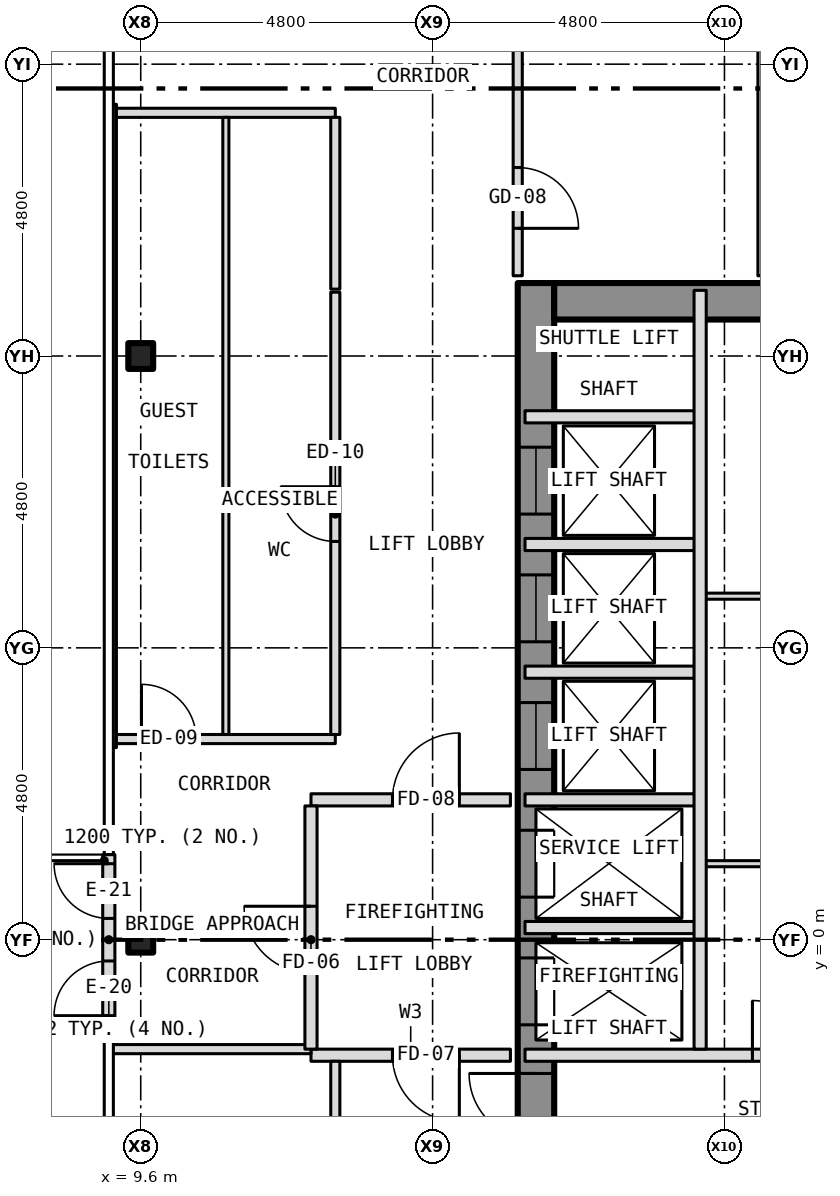
"""IFC4 building model, lengths in metres.
Left out: names, types, materials, properties, quantities, classifications, styles, units other than length and angle.
Written with IfcOpenShell. Run it as: python <this file> out.ifc"""

import sys

from ifc_helpers import new_model, si_unit, direction, frame, frame_2d, origin, origin_2d, place, context, subcontext, project, spatial, rectangle, i_section, extrude, element, fill, save


model = new_model("IFC4")
c1 = context("Model", 3, precision=1e-05, world=origin(), true_north=direction((0.0, 1.0)))
c2 = subcontext(c1, "Body", "Model", "MODEL_VIEW")
j1 = project(units=[si_unit("LENGTHUNIT", "METRE"), si_unit("PLANEANGLEUNIT", "RADIAN")], contexts=[c1])
p1 = place(None, origin())
s1 = spatial("IfcSite", under=j1, at=p1, CompositionType="ELEMENT")
p2 = place(p1, origin())
s2 = spatial("IfcBuilding", under=s1, at=p2, CompositionType="ELEMENT")
p3 = place(p2, frame((0.0, 0.0, 63.5)))
s3 = spatial("IfcBuildingStorey", under=s2, at=p3, CompositionType="ELEMENT", Elevation=63.5)
for number, where, z_axis, x_axis in (
    (1, (9.6, 0.0, -0.15), (0.0, 0.0, 1.0), (1.0, 0.0, 0.0)),
    (2, (9.6, 9.6, -0.15), (0.0, 0.0, 1.0), (1.0, 0.0, 0.0)),
):
    element("IfcColumn", number, at=place(p3, frame(where, z_axis=z_axis, x_axis=x_axis)), inside=s3, PredefinedType="COLUMN", context=c2, shape_type="SweptSolid", body=[
        extrude(i_section(OverallWidth=0.409, OverallDepth=0.424, WebThickness=0.033, FlangeThickness=0.052, at=origin_2d()), origin(), (0.0, 0.0, 1.0), 3.5),
    ])
p4 = place(p3, frame((16.1, -10.8, 0.0), z_axis=(0.0, 0.0, 1.0), x_axis=(0.0, 1.0, 0.0)))
e3 = element("IfcWall", 3, at=p4, inside=s3, PredefinedType="SHEAR", context=c2, shape_type="SweptSolid", body=[
    extrude(rectangle(XDim=21.6, YDim=0.6, at=frame_2d((10.8, 0.0))), origin(), (0.0, 0.0, 1.0), 3.25),
])
p5 = place(p4, frame((9.4, 0.0, 0.0)))
e4 = element("IfcOpeningElement", 4, at=p5, cuts=e3, PredefinedType="OPENING", context=c2, shape_type="SweptSolid", body=[
    extrude(rectangle(XDim=1.1, YDim=2.1, at=frame_2d((0.55, 1.05))), frame((0.0, 0.312, 0.0), z_axis=(0.0, -1.0, 0.0), x_axis=(1.0, 0.0, 0.0)), (0.0, 0.0, 1.0), 0.624),
])
p6 = place(p4, frame((11.5, 0.0, 0.0)))
e5 = element("IfcOpeningElement", 5, at=p6, cuts=e3, PredefinedType="OPENING", context=c2, shape_type="SweptSolid", body=[
    extrude(rectangle(XDim=1.1, YDim=2.1, at=frame_2d((0.55, 1.05))), frame((0.0, 0.312, 0.0), z_axis=(0.0, -1.0, 0.0), x_axis=(1.0, 0.0, 0.0)), (0.0, 0.0, 1.0), 0.624),
])
p7 = place(p4, frame((13.6, 0.0, 0.0)))
e6 = element("IfcOpeningElement", 6, at=p7, cuts=e3, PredefinedType="OPENING", context=c2, shape_type="SweptSolid", body=[
    extrude(rectangle(XDim=1.1, YDim=2.1, at=frame_2d((0.55, 1.05))), frame((0.0, 0.312, 0.0), z_axis=(0.0, -1.0, 0.0), x_axis=(1.0, 0.0, 0.0)), (0.0, 0.0, 1.0), 0.624),
])
p8 = place(p4, frame((15.7, 0.0, 0.0)))
e7 = element("IfcOpeningElement", 7, at=p8, cuts=e3, PredefinedType="OPENING", context=c2, shape_type="SweptSolid", body=[
    extrude(rectangle(XDim=1.1, YDim=2.1, at=frame_2d((0.55, 1.05))), frame((0.0, 0.312, 0.0), z_axis=(0.0, -1.0, 0.0), x_axis=(1.0, 0.0, 0.0)), (0.0, 0.0, 1.0), 0.624),
])
p9 = place(p4, frame((17.8, 0.0, 0.0)))
e8 = element("IfcOpeningElement", 8, at=p9, cuts=e3, PredefinedType="OPENING", context=c2, shape_type="SweptSolid", body=[
    extrude(rectangle(XDim=1.1, YDim=2.1, at=frame_2d((0.55, 1.05))), frame((0.0, 0.312, 0.0), z_axis=(0.0, -1.0, 0.0), x_axis=(1.0, 0.0, 0.0)), (0.0, 0.0, 1.0), 0.624),
])
p10 = place(p4, frame((5.642, 0.0, 0.0)))
e9 = element("IfcOpeningElement", 9, at=p10, cuts=e3, PredefinedType="OPENING", context=c2, shape_type="SweptSolid", body=[
    extrude(rectangle(XDim=1.1, YDim=2.1, at=frame_2d((0.55, 1.05))), frame((0.0, 0.312, 0.0), z_axis=(0.0, -1.0, 0.0), x_axis=(1.0, 0.0, 0.0)), (0.0, 0.0, 1.0), 0.624),
])
p11 = place(p4, frame((7.5, 0.0, 0.0)))
e10 = element("IfcOpeningElement", 10, at=p11, cuts=e3, PredefinedType="OPENING", context=c2, shape_type="SweptSolid", body=[
    extrude(rectangle(XDim=1.1, YDim=2.1, at=frame_2d((0.55, 1.05))), frame((0.0, 0.312, 0.0), z_axis=(0.0, -1.0, 0.0), x_axis=(1.0, 0.0, 0.0)), (0.0, 0.0, 1.0), 0.624),
])
p12 = place(p3, frame((16.4, 10.5, 0.0), z_axis=(0.0, 0.0, 1.0), x_axis=(1.0, 0.0, 0.0)))
e11 = element("IfcWall", 11, at=p12, inside=s3, PredefinedType="SHEAR", context=c2, shape_type="SweptSolid", body=[
    extrude(rectangle(XDim=7.0, YDim=0.6, at=frame_2d((3.5, 0.0))), origin(), (0.0, 0.0, 1.0), 3.25),
])
p13 = place(p3, frame((9.075, -1.4, 0.0), z_axis=(0.0, 0.0, 1.0), x_axis=(0.0, 1.0, 0.0)))
e12 = element("IfcWall", 12, at=p13, inside=s3, PredefinedType="SOLIDWALL", context=c2, shape_type="SweptSolid", body=[
    extrude(rectangle(XDim=2.8, YDim=0.2, at=frame_2d((1.4, 0.0))), origin(), (0.0, 0.0, 1.0), 3.5),
])
p14 = place(p13, frame((0.15, 0.0, 0.0)))
e13 = element("IfcOpeningElement", 13, at=p14, cuts=e12, PredefinedType="OPENING", context=c2, shape_type="SweptSolid", body=[
    extrude(rectangle(XDim=0.9, YDim=2.1, at=frame_2d((0.45, 1.05))), frame((0.0, 0.112, 0.0), z_axis=(0.0, -1.0, 0.0), x_axis=(1.0, 0.0, 0.0)), (0.0, 0.0, 1.0), 0.224),
])
p15 = place(p13, frame((1.75, 0.0, 0.0)))
e14 = element("IfcOpeningElement", 14, at=p15, cuts=e12, PredefinedType="OPENING", context=c2, shape_type="SweptSolid", body=[
    extrude(rectangle(XDim=0.9, YDim=2.1, at=frame_2d((0.45, 1.05))), frame((0.0, 0.112, 0.0), z_axis=(0.0, -1.0, 0.0), x_axis=(1.0, 0.0, 0.0)), (0.0, 0.0, 1.0), 0.224),
])
p16 = place(p3, frame((12.4, -1.9, 0.0), z_axis=(0.0, 0.0, 1.0), x_axis=(1.0, 0.0, 0.0)))
e15 = element("IfcWall", 15, at=p16, inside=s3, PredefinedType="PARTITIONING", context=c2, shape_type="SweptSolid", body=[
    extrude(rectangle(XDim=3.28, YDim=0.2, at=frame_2d((1.64, 0.0))), origin(), (0.0, 0.0, 1.0), 3.35),
])
p17 = place(p16, frame((1.34, 0.0, 0.0)))
e16 = element("IfcOpeningElement", 16, at=p17, cuts=e15, PredefinedType="OPENING", context=c2, shape_type="SweptSolid", body=[
    extrude(rectangle(XDim=1.1, YDim=2.1, at=frame_2d((0.55, 1.05))), frame((0.0, 0.112, 0.0), z_axis=(0.0, -1.0, 0.0), x_axis=(1.0, 0.0, 0.0)), (0.0, 0.0, 1.0), 0.224),
])
p18 = place(p3, frame((15.92, -1.9, 0.0), z_axis=(0.0, 0.0, 1.0), x_axis=(1.0, 0.0, 0.0)))
e17 = element("IfcWall", 17, at=p18, inside=s3, PredefinedType="PARTITIONING", context=c2, shape_type="SweptSolid", body=[
    extrude(rectangle(XDim=7.96, YDim=0.2, at=frame_2d((3.98, 0.0))), origin(), (0.0, 0.0, 1.0), 3.25),
])
p19 = place(p18, frame((3.74, 0.0, 0.0)))
e18 = element("IfcOpeningElement", 18, at=p19, cuts=e17, PredefinedType="OPENING", context=c2, shape_type="SweptSolid", body=[
    extrude(rectangle(XDim=0.9, YDim=2.1, at=frame_2d((0.45, 1.05))), frame((0.0, 0.112, 0.0), z_axis=(0.0, -1.0, 0.0), x_axis=(1.0, 0.0, 0.0)), (0.0, 0.0, 1.0), 0.224),
])
p20 = place(p3, frame((9.12, -1.8, 0.0), z_axis=(0.0, 0.0, 1.0), x_axis=(1.0, 0.0, 0.0)))
e19 = element("IfcWall", 19, at=p20, inside=s3, PredefinedType="PARTITIONING", context=c2, shape_type="SweptSolid", body=[
    extrude(rectangle(XDim=3.28, YDim=0.15, at=frame_2d((1.64, 0.0))), origin(), (0.0, 0.0, 1.0), 3.35),
])
p21 = place(p3, frame((15.92, 0.2, 0.0), z_axis=(0.0, 0.0, 1.0), x_axis=(1.0, 0.0, 0.0)))
e20 = element("IfcWall", 20, at=p21, inside=s3, PredefinedType="PARTITIONING", context=c2, shape_type="SweptSolid", body=[
    extrude(rectangle(XDim=2.88, YDim=0.2, at=frame_2d((1.44, 0.0))), origin(), (0.0, 0.0, 1.0), 3.25),
])
p22 = place(p3, frame((18.8, 1.25, 0.0), z_axis=(0.0, 0.0, 1.0), x_axis=(1.0, 0.0, 0.0)))
e21 = element("IfcWall", 21, at=p22, inside=s3, PredefinedType="PARTITIONING", context=c2, shape_type="SweptSolid", body=[
    extrude(rectangle(XDim=5.08, YDim=0.1, at=frame_2d((2.54, 0.0))), origin(), (0.0, 0.0, 1.0), 3.25),
])
p23 = place(p22, frame((2.15, 0.0, 0.0)))
e22 = element("IfcOpeningElement", 22, at=p23, cuts=e21, PredefinedType="OPENING", context=c2, shape_type="SweptSolid", body=[
    extrude(rectangle(XDim=0.9, YDim=2.1, at=frame_2d((0.45, 1.05))), frame((0.0, 0.062, 0.0), z_axis=(0.0, -1.0, 0.0), x_axis=(1.0, 0.0, 0.0)), (0.0, 0.0, 1.0), 0.124),
])
p24 = place(p3, frame((12.4, 2.3, 0.0), z_axis=(0.0, 0.0, 1.0), x_axis=(1.0, 0.0, 0.0)))
e23 = element("IfcWall", 23, at=p24, inside=s3, PredefinedType="PARTITIONING", context=c2, shape_type="SweptSolid", body=[
    extrude(rectangle(XDim=3.28, YDim=0.2, at=frame_2d((1.64, 0.0))), origin(), (0.0, 0.0, 1.0), 3.35),
])
p25 = place(p24, frame((1.34, 0.0, 0.0)))
e24 = element("IfcOpeningElement", 24, at=p25, cuts=e23, PredefinedType="OPENING", context=c2, shape_type="SweptSolid", body=[
    extrude(rectangle(XDim=1.1, YDim=2.1, at=frame_2d((0.55, 1.05))), frame((0.0, 0.112, 0.0), z_axis=(0.0, -1.0, 0.0), x_axis=(1.0, 0.0, 0.0)), (0.0, 0.0, 1.0), 0.224),
])
p26 = place(p3, frame((15.92, 2.3, 0.0), z_axis=(0.0, 0.0, 1.0), x_axis=(1.0, 0.0, 0.0)))
e25 = element("IfcWall", 25, at=p26, inside=s3, PredefinedType="PARTITIONING", context=c2, shape_type="SweptSolid", body=[
    extrude(rectangle(XDim=2.88, YDim=0.2, at=frame_2d((1.44, 0.0))), origin(), (0.0, 0.0, 1.0), 3.25),
])
p27 = place(p3, frame((9.15, 3.3, 0.0), z_axis=(0.0, 0.0, 1.0), x_axis=(1.0, 0.0, 0.0)))
e26 = element("IfcWall", 26, at=p27, inside=s3, PredefinedType="PARTITIONING", context=c2, shape_type="SweptSolid", body=[
    extrude(rectangle(XDim=3.65, YDim=0.15, at=frame_2d((1.825, 0.0))), origin(), (0.0, 0.0, 1.0), 3.35),
])
p28 = place(p27, frame((0.462, 0.0, 0.0)))
e27 = element("IfcOpeningElement", 27, at=p28, cuts=e26, PredefinedType="OPENING", context=c2, shape_type="SweptSolid", body=[
    extrude(rectangle(XDim=0.9, YDim=2.1, at=frame_2d((0.45, 1.05))), frame((0.0, 0.087, 0.0), z_axis=(0.0, -1.0, 0.0), x_axis=(1.0, 0.0, 0.0)), (0.0, 0.0, 1.0), 0.174),
])
p29 = place(p3, frame((15.92, 4.4, 0.0), z_axis=(0.0, 0.0, 1.0), x_axis=(1.0, 0.0, 0.0)))
e28 = element("IfcWall", 28, at=p29, inside=s3, PredefinedType="PARTITIONING", context=c2, shape_type="SweptSolid", body=[
    extrude(rectangle(XDim=2.88, YDim=0.2, at=frame_2d((1.44, 0.0))), origin(), (0.0, 0.0, 1.0), 3.25),
])
p30 = place(p3, frame((18.8, 5.65, 0.0), z_axis=(0.0, 0.0, 1.0), x_axis=(1.0, 0.0, 0.0)))
e29 = element("IfcWall", 29, at=p30, inside=s3, PredefinedType="PARTITIONING", context=c2, shape_type="SweptSolid", body=[
    extrude(rectangle(XDim=5.08, YDim=0.1, at=frame_2d((2.54, 0.0))), origin(), (0.0, 0.0, 1.0), 3.25),
])
p31 = place(p30, frame((2.15, 0.0, 0.0)))
e30 = element("IfcOpeningElement", 30, at=p31, cuts=e29, PredefinedType="OPENING", context=c2, shape_type="SweptSolid", body=[
    extrude(rectangle(XDim=0.9, YDim=2.1, at=frame_2d((0.45, 1.05))), frame((0.0, 0.062, 0.0), z_axis=(0.0, -1.0, 0.0), x_axis=(1.0, 0.0, 0.0)), (0.0, 0.0, 1.0), 0.124),
])
for number, where, z_axis, x_axis in (
    (31, (15.92, 6.5, 0.0), (0.0, 0.0, 1.0), (1.0, 0.0, 0.0)),
    (32, (15.92, 8.6, 0.0), (0.0, 0.0, 1.0), (1.0, 0.0, 0.0)),
):
    element("IfcWall", number, at=place(p3, frame(where, z_axis=z_axis, x_axis=x_axis)), inside=s3, PredefinedType="PARTITIONING", context=c2, shape_type="SweptSolid", body=[
        extrude(rectangle(XDim=2.88, YDim=0.2, at=frame_2d((1.44, 0.0))), origin(), (0.0, 0.0, 1.0), 3.25),
    ])
p32 = place(p3, frame((9.15, 13.6, 0.0), z_axis=(0.0, 0.0, 1.0), x_axis=(1.0, 0.0, 0.0)))
e33 = element("IfcWall", 33, at=p32, inside=s3, PredefinedType="PARTITIONING", context=c2, shape_type="SweptSolid", body=[
    extrude(rectangle(XDim=3.65, YDim=0.15, at=frame_2d((1.825, 0.0))), origin(), (0.0, 0.0, 1.0), 3.35),
])
p33 = place(p3, frame((9.15, 3.16, 0.0), z_axis=(0.0, 0.0, 1.0), x_axis=(0.0, 1.0, 0.0)))
e34 = element("IfcWall", 34, at=p33, inside=s3, PredefinedType="PARTITIONING", context=c2, shape_type="SweptSolid", body=[
    extrude(rectangle(XDim=10.58, YDim=0.1, at=frame_2d((5.29, 0.0))), origin(), (0.0, 0.0, 1.0), 2.733),
])
p34 = place(p3, frame((11.0, 3.375, 0.0), z_axis=(0.0, 0.0, 1.0), x_axis=(0.0, 1.0, 0.0)))
e35 = element("IfcWall", 35, at=p34, inside=s3, PredefinedType="PARTITIONING", context=c2, shape_type="SweptSolid", body=[
    extrude(rectangle(XDim=10.15, YDim=0.1, at=frame_2d((5.075, 0.0))), origin(), (0.0, 0.0, 1.0), 3.35),
])
p35 = place(p3, frame((12.4, -1.8, 0.0), z_axis=(0.0, 0.0, 1.0), x_axis=(0.0, 1.0, 0.0)))
e36 = element("IfcWall", 36, at=p35, inside=s3, PredefinedType="PARTITIONING", context=c2, shape_type="SweptSolid", body=[
    extrude(rectangle(XDim=4.0, YDim=0.2, at=frame_2d((2.0, 0.0))), origin(), (0.0, 0.0, 1.0), 3.35),
])
p36 = place(p35, frame((1.25, 0.0, 0.0)))
e37 = element("IfcOpeningElement", 37, at=p36, cuts=e36, PredefinedType="OPENING", context=c2, shape_type="SweptSolid", body=[
    extrude(rectangle(XDim=1.1, YDim=2.1, at=frame_2d((0.55, 1.05))), frame((0.0, 0.112, 0.0), z_axis=(0.0, -1.0, 0.0), x_axis=(1.0, 0.0, 0.0)), (0.0, 0.0, 1.0), 0.224),
])
p37 = place(p3, frame((12.8, -13.525, 0.0), z_axis=(0.0, 0.0, 1.0), x_axis=(0.0, 1.0, 0.0)))
e38 = element("IfcWall", 38, at=p37, inside=s3, PredefinedType="PARTITIONING", context=c2, shape_type="SweptSolid", body=[
    extrude(rectangle(XDim=11.525, YDim=0.15, at=frame_2d((5.762, 0.0))), origin(), (0.0, 0.0, 1.0), 3.35),
])
p38 = place(p37, frame((6.725, 0.0, 0.0)))
e39 = element("IfcOpeningElement", 39, at=p38, cuts=e38, PredefinedType="OPENING", context=c2, shape_type="SweptSolid", body=[
    extrude(rectangle(XDim=0.9, YDim=2.1, at=frame_2d((0.45, 1.05))), frame((0.0, 0.087, 0.0), z_axis=(0.0, -1.0, 0.0), x_axis=(1.0, 0.0, 0.0)), (0.0, 0.0, 1.0), 0.174),
])
p39 = place(p3, frame((12.8, 3.375, 0.0), z_axis=(0.0, 0.0, 1.0), x_axis=(0.0, 1.0, 0.0)))
e40 = element("IfcWall", 40, at=p39, inside=s3, PredefinedType="PARTITIONING", context=c2, shape_type="SweptSolid", body=[
    extrude(rectangle(XDim=7.275, YDim=0.15, at=frame_2d((3.637, 0.0))), origin(), (0.0, 0.0, 1.0), 3.35),
])
p40 = place(p39, frame((3.175, 0.0, 0.0)))
e41 = element("IfcOpeningElement", 41, at=p40, cuts=e40, PredefinedType="OPENING", context=c2, shape_type="SweptSolid", body=[
    extrude(rectangle(XDim=0.9, YDim=2.1, at=frame_2d((0.45, 1.05))), frame((0.0, 0.087, 0.0), z_axis=(0.0, -1.0, 0.0), x_axis=(1.0, 0.0, 0.0)), (0.0, 0.0, 1.0), 0.174),
])
p41 = place(p3, frame((12.8, 10.7, 0.0), z_axis=(0.0, 0.0, 1.0), x_axis=(0.0, 1.0, 0.0)))
e42 = element("IfcWall", 42, at=p41, inside=s3, PredefinedType="PARTITIONING", context=c2, shape_type="SweptSolid", body=[
    extrude(rectangle(XDim=2.825, YDim=0.15, at=frame_2d((1.413, 0.0))), origin(), (0.0, 0.0, 1.0), 3.35),
])
p42 = place(p3, frame((15.8, 10.92, 0.0), z_axis=(0.0, 0.0, 1.0), x_axis=(0.0, 1.0, 0.0)))
e43 = element("IfcWall", 43, at=p42, inside=s3, PredefinedType="PARTITIONING", context=c2, shape_type="SweptSolid", body=[
    extrude(rectangle(XDim=4.805, YDim=0.15, at=frame_2d((2.403, 0.0))), origin(), (0.0, 0.0, 1.0), 3.35),
])
p43 = place(p42, frame((0.78, 0.0, 0.0)))
e44 = element("IfcOpeningElement", 44, at=p43, cuts=e43, PredefinedType="OPENING", context=c2, shape_type="SweptSolid", body=[
    extrude(rectangle(XDim=1.0, YDim=2.1, at=frame_2d((0.5, 1.05))), frame((0.0, 0.087, 0.0), z_axis=(0.0, -1.0, 0.0), x_axis=(1.0, 0.0, 0.0)), (0.0, 0.0, 1.0), 0.174),
])
p44 = place(p3, frame((18.8, -1.8, 0.0), z_axis=(0.0, 0.0, 1.0), x_axis=(0.0, 1.0, 0.0)))
e45 = element("IfcWall", 45, at=p44, inside=s3, PredefinedType="PARTITIONING", context=c2, shape_type="SweptSolid", body=[
    extrude(rectangle(XDim=12.48, YDim=0.2, at=frame_2d((6.24, 0.0))), origin(), (0.0, 0.0, 1.0), 3.25),
])
p45 = place(p3, frame((19.8, 10.92, 0.0), z_axis=(0.0, 0.0, 1.0), x_axis=(0.0, 1.0, 0.0)))
e46 = element("IfcWall", 46, at=p45, inside=s3, PredefinedType="PARTITIONING", context=c2, shape_type="SweptSolid", body=[
    extrude(rectangle(XDim=12.96, YDim=0.1, at=frame_2d((6.48, 0.0))), origin(), (0.0, 0.0, 1.0), 3.35),
])
p46 = place(p45, frame((6.03, 0.0, 0.0)))
e47 = element("IfcOpeningElement", 47, at=p46, cuts=e46, PredefinedType="OPENING", context=c2, shape_type="SweptSolid", body=[
    extrude(rectangle(XDim=0.9, YDim=2.1, at=frame_2d((0.45, 1.05))), frame((0.0, 0.062, 0.0), z_axis=(0.0, -1.0, 0.0), x_axis=(1.0, 0.0, 0.0)), (0.0, 0.0, 1.0), 0.124),
])
p47 = place(p14, origin())
e48 = element("IfcDoor", 48, at=p47, inside=s3, OperationType="SINGLE_SWING_LEFT", PredefinedType="DOOR", context=c2, shape_type="SweptSolid", body=[
    extrude(rectangle(XDim=0.9, YDim=2.1, at=frame_2d((0.45, 1.05))), frame((0.0, 0.025, 0.0), z_axis=(0.0, -1.0, 0.0), x_axis=(1.0, 0.0, 0.0)), (0.0, 0.0, 1.0), 0.05),
])
fill(e13, e48)
p48 = place(p15, origin())
e49 = element("IfcDoor", 49, at=p48, inside=s3, OperationType="SINGLE_SWING_RIGHT", PredefinedType="DOOR", context=c2, shape_type="SweptSolid", body=[
    extrude(rectangle(XDim=0.9, YDim=2.1, at=frame_2d((0.45, 1.05))), frame((0.0, 0.025, 0.0), z_axis=(0.0, -1.0, 0.0), x_axis=(1.0, 0.0, 0.0)), (0.0, 0.0, 1.0), 0.05),
])
fill(e14, e49)
p49 = place(p5, origin())
e50 = element("IfcDoor", 50, at=p49, inside=s3, OperationType="SLIDING_TO_LEFT", PredefinedType="DOOR", context=c2, shape_type="SweptSolid", body=[
    extrude(rectangle(XDim=1.1, YDim=2.1, at=frame_2d((0.55, 1.05))), frame((0.0, 0.025, 0.0), z_axis=(0.0, -1.0, 0.0), x_axis=(1.0, 0.0, 0.0)), (0.0, 0.0, 1.0), 0.05),
])
fill(e4, e50)
p50 = place(p6, origin())
e51 = element("IfcDoor", 51, at=p50, inside=s3, OperationType="SLIDING_TO_LEFT", PredefinedType="DOOR", context=c2, shape_type="SweptSolid", body=[
    extrude(rectangle(XDim=1.1, YDim=2.1, at=frame_2d((0.55, 1.05))), frame((0.0, 0.025, 0.0), z_axis=(0.0, -1.0, 0.0), x_axis=(1.0, 0.0, 0.0)), (0.0, 0.0, 1.0), 0.05),
])
fill(e5, e51)
p51 = place(p7, origin())
e52 = element("IfcDoor", 52, at=p51, inside=s3, OperationType="SLIDING_TO_LEFT", PredefinedType="DOOR", context=c2, shape_type="SweptSolid", body=[
    extrude(rectangle(XDim=1.1, YDim=2.1, at=frame_2d((0.55, 1.05))), frame((0.0, 0.025, 0.0), z_axis=(0.0, -1.0, 0.0), x_axis=(1.0, 0.0, 0.0)), (0.0, 0.0, 1.0), 0.05),
])
fill(e6, e52)
p52 = place(p8, origin())
e53 = element("IfcDoor", 53, at=p52, inside=s3, OperationType="SLIDING_TO_LEFT", PredefinedType="DOOR", context=c2, shape_type="SweptSolid", body=[
    extrude(rectangle(XDim=1.1, YDim=2.1, at=frame_2d((0.55, 1.05))), frame((0.0, 0.025, 0.0), z_axis=(0.0, -1.0, 0.0), x_axis=(1.0, 0.0, 0.0)), (0.0, 0.0, 1.0), 0.05),
])
fill(e7, e53)
p53 = place(p9, origin())
e54 = element("IfcDoor", 54, at=p53, inside=s3, OperationType="SLIDING_TO_LEFT", PredefinedType="DOOR", context=c2, shape_type="SweptSolid", body=[
    extrude(rectangle(XDim=1.1, YDim=2.1, at=frame_2d((0.55, 1.05))), frame((0.0, 0.025, 0.0), z_axis=(0.0, -1.0, 0.0), x_axis=(1.0, 0.0, 0.0)), (0.0, 0.0, 1.0), 0.05),
])
fill(e8, e54)
p54 = place(p11, origin())
e55 = element("IfcDoor", 55, at=p54, inside=s3, OperationType="SINGLE_SWING_RIGHT", PredefinedType="DOOR", context=c2, shape_type="SweptSolid", body=[
    extrude(rectangle(XDim=1.1, YDim=2.1, at=frame_2d((0.55, 1.05))), frame((0.0, 0.025, 0.0), z_axis=(0.0, -1.0, 0.0), x_axis=(1.0, 0.0, 0.0)), (0.0, 0.0, 1.0), 0.05),
])
fill(e10, e55)
p55 = place(p19, origin())
e56 = element("IfcDoor", 56, at=p55, inside=s3, OperationType="SINGLE_SWING_LEFT", PredefinedType="DOOR", context=c2, shape_type="SweptSolid", body=[
    extrude(rectangle(XDim=0.9, YDim=2.1, at=frame_2d((0.45, 1.05))), frame((0.0, 0.025, 0.0), z_axis=(0.0, -1.0, 0.0), x_axis=(1.0, 0.0, 0.0)), (0.0, 0.0, 1.0), 0.05),
])
fill(e18, e56)
p56 = place(p36, origin())
e57 = element("IfcDoor", 57, at=p56, inside=s3, OperationType="SINGLE_SWING_RIGHT", PredefinedType="DOOR", context=c2, shape_type="SweptSolid", body=[
    extrude(rectangle(XDim=1.1, YDim=2.1, at=frame_2d((0.55, 1.05))), frame((0.0, 0.025, 0.0), z_axis=(0.0, -1.0, 0.0), x_axis=(1.0, 0.0, 0.0)), (0.0, 0.0, 1.0), 0.05),
])
fill(e37, e57)
p57 = place(p17, origin())
e58 = element("IfcDoor", 58, at=p57, inside=s3, OperationType="SINGLE_SWING_RIGHT", PredefinedType="DOOR", context=c2, shape_type="SweptSolid", body=[
    extrude(rectangle(XDim=1.1, YDim=2.1, at=frame_2d((0.55, 1.05))), frame((0.0, 0.025, 0.0), z_axis=(0.0, -1.0, 0.0), x_axis=(1.0, 0.0, 0.0)), (0.0, 0.0, 1.0), 0.05),
])
fill(e16, e58)
p58 = place(p25, origin())
e59 = element("IfcDoor", 59, at=p58, inside=s3, OperationType="SINGLE_SWING_RIGHT", PredefinedType="DOOR", context=c2, shape_type="SweptSolid", body=[
    extrude(rectangle(XDim=1.1, YDim=2.1, at=frame_2d((0.55, 1.05))), frame((0.0, 0.025, 0.0), z_axis=(0.0, -1.0, 0.0), x_axis=(1.0, 0.0, 0.0)), (0.0, 0.0, 1.0), 0.05),
])
fill(e24, e59)
p59 = place(p43, origin())
e60 = element("IfcDoor", 60, at=p59, inside=s3, OperationType="SINGLE_SWING_LEFT", PredefinedType="DOOR", context=c2, shape_type="SweptSolid", body=[
    extrude(rectangle(XDim=1.0, YDim=2.1, at=frame_2d((0.5, 1.05))), frame((0.0, 0.025, 0.0), z_axis=(0.0, -1.0, 0.0), x_axis=(1.0, 0.0, 0.0)), (0.0, 0.0, 1.0), 0.05),
])
fill(e44, e60)
p60 = place(p28, origin())
e61 = element("IfcDoor", 61, at=p60, inside=s3, OperationType="SINGLE_SWING_LEFT", PredefinedType="DOOR", context=c2, shape_type="SweptSolid", body=[
    extrude(rectangle(XDim=0.9, YDim=2.1, at=frame_2d((0.45, 1.05))), frame((0.0, 0.025, 0.0), z_axis=(0.0, -1.0, 0.0), x_axis=(1.0, 0.0, 0.0)), (0.0, 0.0, 1.0), 0.05),
])
fill(e27, e61)
p61 = place(p40, origin())
e62 = element("IfcDoor", 62, at=p61, inside=s3, OperationType="SINGLE_SWING_RIGHT", PredefinedType="DOOR", context=c2, shape_type="SweptSolid", body=[
    extrude(rectangle(XDim=0.9, YDim=2.1, at=frame_2d((0.45, 1.05))), frame((0.0, 0.025, 0.0), z_axis=(0.0, -1.0, 0.0), x_axis=(1.0, 0.0, 0.0)), (0.0, 0.0, 1.0), 0.05),
])
fill(e41, e62)
save(model, sys.argv[1])
